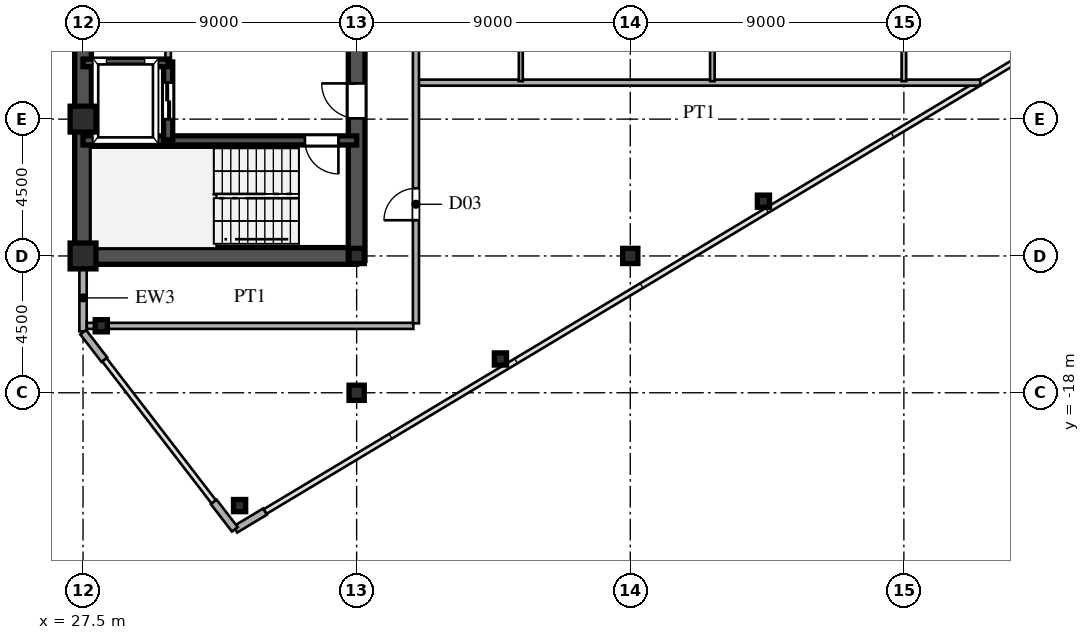
"""IFC4 building model, lengths in metres.
Left out: names, types, materials, properties, quantities, classifications, styles, units other than length and angle.
Written with IfcOpenShell. Run it as: python <this file> out.ifc"""

import sys

from ifc_helpers import new_model, si_unit, direction, frame, frame_2d, origin, origin_2d, place, context, subcontext, project, spatial, rectangle, hollow_rectangle, i_section, extrude, source, transform, mapped, element, fill, save


model = new_model("IFC4")
c1 = context("Model", 3, precision=1e-05, world=origin(), true_north=direction((0.0, 1.0)))
c2 = subcontext(c1, "Body", "Model", "MODEL_VIEW")
j1 = project(units=[si_unit("LENGTHUNIT", "METRE"), si_unit("PLANEANGLEUNIT", "RADIAN")], contexts=[c1])
p1 = place(None, origin())
s1 = spatial("IfcSite", under=j1, at=p1, CompositionType="ELEMENT")
p2 = place(p1, origin())
s2 = spatial("IfcBuilding", under=s1, at=p2, CompositionType="ELEMENT")
p3 = place(p2, frame((0.0, 0.0, 199.5)))
s3 = spatial("IfcBuildingStorey", under=s2, at=p3, CompositionType="ELEMENT", Elevation=199.5)
m1 = source(origin(), c2, "Body", "SweptSolid", [
    extrude(hollow_rectangle(XDim=0.85, YDim=0.85, WallThickness=0.036, at=origin_2d()), origin(), (0.0, 0.0, 1.0), 3.6),
])
for number, where, z_axis, x_axis in (
    (1, (27.5, -13.5, 0.0), (0.0, 0.0, 1.0), (1.0, 0.0, 0.0)),
    (2, (27.5, -9.0, 0.0), (0.0, 0.0, 1.0), (1.0, 0.0, 0.0)),
):
    element("IfcColumn", number, at=place(p3, frame(where, z_axis=z_axis, x_axis=x_axis)), inside=s3, PredefinedType="COLUMN", context=c2, shape_type="MappedRepresentation", body=[
        mapped(m1, transform((0.0, 0.0, 0.0), scale=1.0)),
    ])
m2 = source(origin(), c2, "Body", "SweptSolid", [
    extrude(i_section(OverallWidth=0.5, OverallDepth=0.5, WebThickness=0.02, FlangeThickness=0.032, at=origin_2d()), origin(), (0.0, 0.0, 1.0), 3.6),
])
for number, where, z_axis, x_axis in (
    (3, (36.5, -18.0, 0.0), (0.0, 0.0, 1.0), (1.0, 0.0, 0.0)),
    (4, (36.5, -13.5, 0.0), (0.0, 0.0, 1.0), (1.0, 0.0, 0.0)),
    (5, (45.5, -13.5, 0.0), (0.0, 0.0, 1.0), (1.0, 0.0, 0.0)),
):
    element("IfcColumn", number, at=place(p3, frame(where, z_axis=z_axis, x_axis=x_axis)), inside=s3, PredefinedType="COLUMN", context=c2, shape_type="MappedRepresentation", body=[
        mapped(m2, transform((0.0, 0.0, 0.0), scale=1.0)),
    ])
m3 = source(origin(), c2, "Body", "SweptSolid", [
    extrude(hollow_rectangle(XDim=0.4, YDim=0.4, WallThickness=0.016, at=origin_2d()), origin(), (0.0, 0.0, 1.0), 3.6),
])
for number, where, z_axis, x_axis in (
    (6, (32.65, -21.71, 0.0), (0.0, 0.0, 1.0), (1.0, 0.0, 0.0)),
    (7, (28.1, -15.796, 0.0), (0.0, 0.0, 1.0), (1.0, 0.0, 0.0)),
    (8, (41.23, -16.889, 0.0), (0.0, 0.0, 1.0), (1.0, 0.0, 0.0)),
    (9, (49.88, -11.699, 0.0), (0.0, 0.0, 1.0), (1.0, 0.0, 0.0)),
):
    element("IfcColumn", number, at=place(p3, frame(where, z_axis=z_axis, x_axis=x_axis)), inside=s3, PredefinedType="COLUMN", context=c2, shape_type="MappedRepresentation", body=[
        mapped(m3, transform((0.0, 0.0, 0.0), scale=1.0)),
    ])
p4 = place(p3, frame((32.509, -22.495, 0.0), z_axis=(0.0, 0.0, 1.0), x_axis=(0.85743623509, 0.514590228002, 0.0)))
e10 = element("IfcWall", 10, at=p4, inside=s3, PredefinedType="SOLIDWALL", context=c2, shape_type="SweptSolid", body=[
    extrude(rectangle(XDim=1.14, YDim=0.24, at=frame_2d((0.57, 0.0))), origin(), (0.0, 0.0, 1.0), 3.38),
])
p5 = place(p3, frame((27.5, -15.98, 0.0), z_axis=(0.0, 0.0, 1.0), x_axis=(0.0, 1.0, 0.0)))
e11 = element("IfcWall", 11, at=p5, inside=s3, PredefinedType="SOLIDWALL", context=c2, shape_type="SweptSolid", body=[
    extrude(rectangle(XDim=1.6, YDim=0.24, at=frame_2d((0.8, 0.0))), origin(), (0.0, 0.0, 1.0), 3.38),
])
p6 = place(p3, frame((27.5, -14.38, 0.0), z_axis=(0.0, 0.0, 1.0), x_axis=(0.0, 1.0, 0.0)))
e12 = element("IfcWall", 12, at=p6, inside=s3, PredefinedType="SOLIDWALL", context=c2, shape_type="SweptSolid", body=[
    extrude(rectangle(XDim=0.6, YDim=0.24, at=frame_2d((0.3, 0.0))), origin(), (0.0, 0.0, 1.0), 2.88),
])
for number, where, z_axis, x_axis in (
    (13, (27.506, -16.008, 0.0), (0.0, 0.0, 1.0), (0.61, -0.793, 0.0)),
    (14, (31.799, -21.588, 0.0), (0.0, 0.0, 1.0), (0.61, -0.793, 0.0)),
):
    element("IfcWall", number, at=place(p3, frame(where, z_axis=z_axis, x_axis=x_axis)), inside=s3, PredefinedType="SOLIDWALL", context=c2, shape_type="SweptSolid", body=[
        extrude(rectangle(XDim=1.14, YDim=0.24, at=frame_2d((0.57, 0.0))), origin(), (0.0, 0.0, 1.0), 3.38),
    ])
p7 = place(p3, frame((27.5, -13.5, 0.0), z_axis=(0.0, 0.0, 1.0), x_axis=(0.0, 1.0, 0.0)))
e15 = element("IfcWall", 15, at=p7, inside=s3, PredefinedType="SHEAR", context=c2, shape_type="SweptSolid", body=[
    extrude(rectangle(XDim=12.2, YDim=0.55, at=frame_2d((6.1, 0.0))), origin(), (0.0, 0.0, 1.0), 3.38),
])
p8 = place(p3, frame((27.5, -13.5, 0.0), z_axis=(0.0, 0.0, 1.0), x_axis=(1.0, 0.0, 0.0)))
e16 = element("IfcWall", 16, at=p8, inside=s3, PredefinedType="SHEAR", context=c2, shape_type="SweptSolid", body=[
    extrude(rectangle(XDim=9.0, YDim=0.55, at=frame_2d((4.5, 0.0))), origin(), (0.0, 0.0, 1.0), 3.38),
])
p9 = place(p3, frame((36.5, -13.65, 0.0), z_axis=(0.0, 0.0, 1.0), x_axis=(0.0, 1.0, 0.0)))
e17 = element("IfcWall", 17, at=p9, inside=s3, PredefinedType="SHEAR", context=c2, shape_type="SweptSolid", body=[
    extrude(rectangle(XDim=7.15, YDim=0.55, at=frame_2d((3.575, 0.0))), origin(), (0.0, 0.0, 1.0), 3.38),
])
p10 = place(p9, frame((4.675, 0.0, 0.0)))
e18 = element("IfcOpeningElement", 18, at=p10, cuts=e17, PredefinedType="OPENING", context=c2, shape_type="SweptSolid", body=[
    extrude(rectangle(XDim=1.15, YDim=2.2, at=frame_2d((0.575, 1.1))), frame((0.0, 0.285, 0.0), z_axis=(0.0, -1.0, 0.0), x_axis=(1.0, 0.0, 0.0)), (0.0, 0.0, 1.0), 0.57),
])
p11 = place(p3, frame((27.5, -9.7, 0.0), z_axis=(0.0, 0.0, 1.0), x_axis=(1.0, 0.0, 0.0)))
e19 = element("IfcWall", 19, at=p11, inside=s3, PredefinedType="SHEAR", context=c2, shape_type="SweptSolid", body=[
    extrude(rectangle(XDim=9.0, YDim=0.3, at=frame_2d((4.5, 0.0))), origin(), (0.0, 0.0, 1.0), 3.38),
])
p12 = place(p11, frame((7.3, 0.0, 0.0)))
e20 = element("IfcOpeningElement", 20, at=p12, cuts=e19, PredefinedType="OPENING", context=c2, shape_type="SweptSolid", body=[
    extrude(rectangle(XDim=1.1, YDim=2.2, at=frame_2d((0.55, 1.1))), frame((0.0, 0.16, 0.0), z_axis=(0.0, -1.0, 0.0), x_axis=(1.0, 0.0, 0.0)), (0.0, 0.0, 1.0), 0.32),
])
p13 = place(p3, frame((27.5, -7.15, 0.0), z_axis=(0.0, 0.0, 1.0), x_axis=(1.0, 0.0, 0.0)))
e21 = element("IfcWall", 21, at=p13, inside=s3, PredefinedType="SHEAR", context=c2, shape_type="SweptSolid", body=[
    extrude(rectangle(XDim=2.8, YDim=0.25, at=frame_2d((1.4, 0.0))), origin(), (0.0, 0.0, 1.0), 3.38),
])
p14 = place(p3, frame((30.3, -9.68, 0.0), z_axis=(0.0, 0.0, 1.0), x_axis=(0.0, 1.0, 0.0)))
e22 = element("IfcWall", 22, at=p14, inside=s3, PredefinedType="SHEAR", context=c2, shape_type="SweptSolid", body=[
    extrude(rectangle(XDim=2.56, YDim=0.3, at=frame_2d((1.28, 0.0))), origin(), (0.0, 0.0, 1.0), 3.38),
])
p15 = place(p14, frame((0.68, 0.0, 0.0)))
e23 = element("IfcOpeningElement", 23, at=p15, cuts=e22, PredefinedType="OPENING", context=c2, shape_type="SweptSolid", body=[
    extrude(rectangle(XDim=1.2, YDim=2.25, at=frame_2d((0.6, 1.125))), frame((0.0, 0.16, 0.0), z_axis=(0.0, -1.0, 0.0), x_axis=(1.0, 0.0, 0.0)), (0.0, 0.0, 1.0), 0.32),
])
p16 = place(p3, frame((30.3, -7.12, 0.0), z_axis=(0.0, 0.0, 1.0), x_axis=(0.0, 1.0, 0.0)))
e24 = element("IfcWall", 24, at=p16, inside=s3, PredefinedType="PARTITIONING", context=c2, shape_type="SweptSolid", body=[
    extrude(rectangle(XDim=0.62, YDim=0.18, at=frame_2d((0.31, 0.0))), origin(), (0.0, 0.0, 1.0), 3.38),
])
p17 = place(p3, frame((27.625, -15.8, 0.0), z_axis=(0.0, 0.0, 1.0), x_axis=(1.0, 0.0, 0.0)))
e25 = element("IfcWall", 25, at=p17, inside=s3, PredefinedType="PARTITIONING", context=c2, shape_type="SweptSolid", body=[
    extrude(rectangle(XDim=10.74, YDim=0.2, at=frame_2d((5.37, 0.0))), origin(), (0.0, 0.0, 1.0), 3.38),
])
p18 = place(p3, frame((38.53, -7.8, 0.0), z_axis=(0.0, 0.0, 1.0), x_axis=(1.0, 0.0, 0.0)))
e26 = element("IfcWall", 26, at=p18, inside=s3, PredefinedType="PARTITIONING", context=c2, shape_type="SweptSolid", body=[
    extrude(rectangle(XDim=18.48, YDim=0.2, at=frame_2d((9.24, 0.0))), origin(), (0.0, 0.0, 1.0), 3.38),
])
p19 = place(p3, frame((38.45, -15.715, 0.0), z_axis=(0.0, 0.0, 1.0), x_axis=(0.0, 1.0, 0.0)))
e27 = element("IfcWall", 27, at=p19, inside=s3, PredefinedType="PARTITIONING", context=c2, shape_type="SweptSolid", body=[
    extrude(rectangle(XDim=31.43, YDim=0.2, at=frame_2d((15.715, 0.0))), origin(), (0.0, 0.0, 1.0), 3.38),
])
p20 = place(p19, frame((3.39, 0.0, 0.0)))
e28 = element("IfcOpeningElement", 28, at=p20, cuts=e27, PredefinedType="OPENING", context=c2, shape_type="SweptSolid", body=[
    extrude(rectangle(XDim=1.05, YDim=2.25, at=frame_2d((0.525, 1.125))), frame((0.0, 0.11, 0.0), z_axis=(0.0, -1.0, 0.0), x_axis=(1.0, 0.0, 0.0)), (0.0, 0.0, 1.0), 0.22),
])
p21 = place(p19, frame((13.986, 0.0, 0.0)))
e29 = element("IfcOpeningElement", 29, at=p21, cuts=e27, PredefinedType="OPENING", context=c2, shape_type="SweptSolid", body=[
    extrude(rectangle(XDim=1.05, YDim=2.25, at=frame_2d((0.525, 1.125))), frame((0.0, 0.11, 0.0), z_axis=(0.0, -1.0, 0.0), x_axis=(1.0, 0.0, 0.0)), (0.0, 0.0, 1.0), 0.22),
])
p22 = place(p19, frame((22.387, 0.0, 0.0)))
e30 = element("IfcOpeningElement", 30, at=p22, cuts=e27, PredefinedType="OPENING", context=c2, shape_type="SweptSolid", body=[
    extrude(rectangle(XDim=1.05, YDim=2.25, at=frame_2d((0.525, 1.125))), frame((0.0, 0.11, 0.0), z_axis=(0.0, -1.0, 0.0), x_axis=(1.0, 0.0, 0.0)), (0.0, 0.0, 1.0), 0.22),
])
p23 = place(p3, frame((41.9, -7.75, 0.0), z_axis=(0.0, 0.0, 1.0), x_axis=(0.0, 1.0, 0.0)))
e31 = element("IfcWall", 31, at=p23, inside=s3, PredefinedType="PARTITIONING", context=c2, shape_type="SweptSolid", body=[
    extrude(rectangle(XDim=8.967, YDim=0.13, at=frame_2d((4.483, 0.0))), origin(), (0.0, 0.0, 1.0), 3.38),
])
p24 = place(p23, frame((6.275, 0.0, 0.0)))
e32 = element("IfcOpeningElement", 32, at=p24, cuts=e31, PredefinedType="OPENING", context=c2, shape_type="SweptSolid", body=[
    extrude(rectangle(XDim=0.95, YDim=2.15, at=frame_2d((0.475, 1.075))), frame((0.0, 0.075, 0.0), z_axis=(0.0, -1.0, 0.0), x_axis=(1.0, 0.0, 0.0)), (0.0, 0.0, 1.0), 0.15),
])
p25 = place(p3, frame((48.2, -7.75, 0.0), z_axis=(0.0, 0.0, 1.0), x_axis=(0.0, 1.0, 0.0)))
e33 = element("IfcWall", 33, at=p25, inside=s3, PredefinedType="PARTITIONING", context=c2, shape_type="SweptSolid", body=[
    extrude(rectangle(XDim=13.5, YDim=0.15, at=frame_2d((6.75, 0.0))), origin(), (0.0, 0.0, 1.0), 3.38),
])
p26 = place(p25, frame((6.275, 0.0, 0.0)))
e34 = element("IfcOpeningElement", 34, at=p26, cuts=e33, PredefinedType="OPENING", context=c2, shape_type="SweptSolid", body=[
    extrude(rectangle(XDim=0.95, YDim=2.15, at=frame_2d((0.475, 1.075))), frame((0.0, 0.085, 0.0), z_axis=(0.0, -1.0, 0.0), x_axis=(1.0, 0.0, 0.0)), (0.0, 0.0, 1.0), 0.17),
])
p27 = place(p25, frame((1.742, 0.0, 0.0)))
e35 = element("IfcOpeningElement", 35, at=p27, cuts=e33, PredefinedType="OPENING", context=c2, shape_type="SweptSolid", body=[
    extrude(rectangle(XDim=0.95, YDim=2.15, at=frame_2d((0.475, 1.075))), frame((0.0, 0.085, 0.0), z_axis=(0.0, -1.0, 0.0), x_axis=(1.0, 0.0, 0.0)), (0.0, 0.0, 1.0), 0.17),
])
p28 = place(p3, frame((54.5, -7.75, 0.0), z_axis=(0.0, 0.0, 1.0), x_axis=(0.0, 1.0, 0.0)))
e36 = element("IfcWall", 36, at=p28, inside=s3, PredefinedType="PARTITIONING", context=c2, shape_type="SweptSolid", body=[
    extrude(rectangle(XDim=17.085, YDim=0.15, at=frame_2d((8.542, 0.0))), origin(), (0.0, 0.0, 1.0), 2.78),
])
p29 = place(p28, frame((6.275, 0.0, 0.0)))
e37 = element("IfcOpeningElement", 37, at=p29, cuts=e36, PredefinedType="OPENING", context=c2, shape_type="SweptSolid", body=[
    extrude(rectangle(XDim=0.95, YDim=2.15, at=frame_2d((0.475, 1.075))), frame((0.0, 0.085, 0.0), z_axis=(0.0, -1.0, 0.0), x_axis=(1.0, 0.0, 0.0)), (0.0, 0.0, 1.0), 0.17),
])
p30 = place(p28, frame((10.808, 0.0, 0.0)))
e38 = element("IfcOpeningElement", 38, at=p30, cuts=e36, PredefinedType="OPENING", context=c2, shape_type="SweptSolid", body=[
    extrude(rectangle(XDim=0.95, YDim=2.15, at=frame_2d((0.475, 1.075))), frame((0.0, 0.085, 0.0), z_axis=(0.0, -1.0, 0.0), x_axis=(1.0, 0.0, 0.0)), (0.0, 0.0, 1.0), 0.17),
])
p31 = place(p28, frame((14.825, 0.0, 0.0)))
e39 = element("IfcOpeningElement", 39, at=p31, cuts=e36, PredefinedType="OPENING", context=c2, shape_type="SweptSolid", body=[
    extrude(rectangle(XDim=0.95, YDim=2.15, at=frame_2d((0.475, 1.075))), frame((0.0, 0.085, 0.0), z_axis=(0.0, -1.0, 0.0), x_axis=(1.0, 0.0, 0.0)), (0.0, 0.0, 1.0), 0.17),
])
m4 = source(origin(), c2, "Body", "SweptSolid", [
    extrude(rectangle(XDim=1.15, YDim=2.2, at=frame_2d((0.575, 1.1))), frame((0.0, 0.025, 0.0), z_axis=(0.0, -1.0, 0.0), x_axis=(1.0, 0.0, 0.0)), (0.0, 0.0, 1.0), 0.05),
])
p32 = place(p10, origin())
e40 = element("IfcDoor", 40, at=p32, inside=s3, OperationType="SINGLE_SWING_RIGHT", PredefinedType="DOOR", context=c2, shape_type="MappedRepresentation", body=[
    mapped(m4, transform((0.0, 0.0, 0.0), scale=1.0)),
])
fill(e18, e40)
m5 = source(origin(), c2, "Body", "SweptSolid", [
    extrude(rectangle(XDim=1.1, YDim=2.2, at=frame_2d((0.55, 1.1))), frame((0.0, 0.025, 0.0), z_axis=(0.0, -1.0, 0.0), x_axis=(1.0, 0.0, 0.0)), (0.0, 0.0, 1.0), 0.05),
])
p33 = place(p12, frame((1.1, 0.0, 0.0), z_axis=(0.0, 0.0, 1.0), x_axis=(-1.0, 0.0, 0.0)))
e41 = element("IfcDoor", 41, at=p33, inside=s3, OperationType="SINGLE_SWING_RIGHT", PredefinedType="DOOR", context=c2, shape_type="MappedRepresentation", body=[
    mapped(m5, transform((0.0, 0.0, 0.0), scale=1.0)),
])
fill(e20, e41)
m6 = source(origin(), c2, "Body", "SweptSolid", [
    extrude(rectangle(XDim=1.2, YDim=2.25, at=frame_2d((0.6, 1.125))), frame((0.0, 0.025, 0.0), z_axis=(0.0, -1.0, 0.0), x_axis=(1.0, 0.0, 0.0)), (0.0, 0.0, 1.0), 0.05),
])
p34 = place(p15, origin())
e42 = element("IfcDoor", 42, at=p34, inside=s3, OperationType="DOUBLE_DOOR_SLIDING", PredefinedType="DOOR", context=c2, shape_type="MappedRepresentation", body=[
    mapped(m6, transform((0.0, 0.0, 0.0), scale=1.0)),
])
fill(e23, e42)
m7 = source(origin(), c2, "Body", "SweptSolid", [
    extrude(rectangle(XDim=1.05, YDim=2.25, at=frame_2d((0.525, 1.125))), frame((0.0, 0.025, 0.0), z_axis=(0.0, -1.0, 0.0), x_axis=(1.0, 0.0, 0.0)), (0.0, 0.0, 1.0), 0.05),
])
p35 = place(p20, origin())
e43 = element("IfcDoor", 43, at=p35, inside=s3, OperationType="SINGLE_SWING_LEFT", PredefinedType="DOOR", context=c2, shape_type="MappedRepresentation", body=[
    mapped(m7, transform((0.0, 0.0, 0.0), scale=1.0)),
])
fill(e28, e43)
save(model, sys.argv[1])
